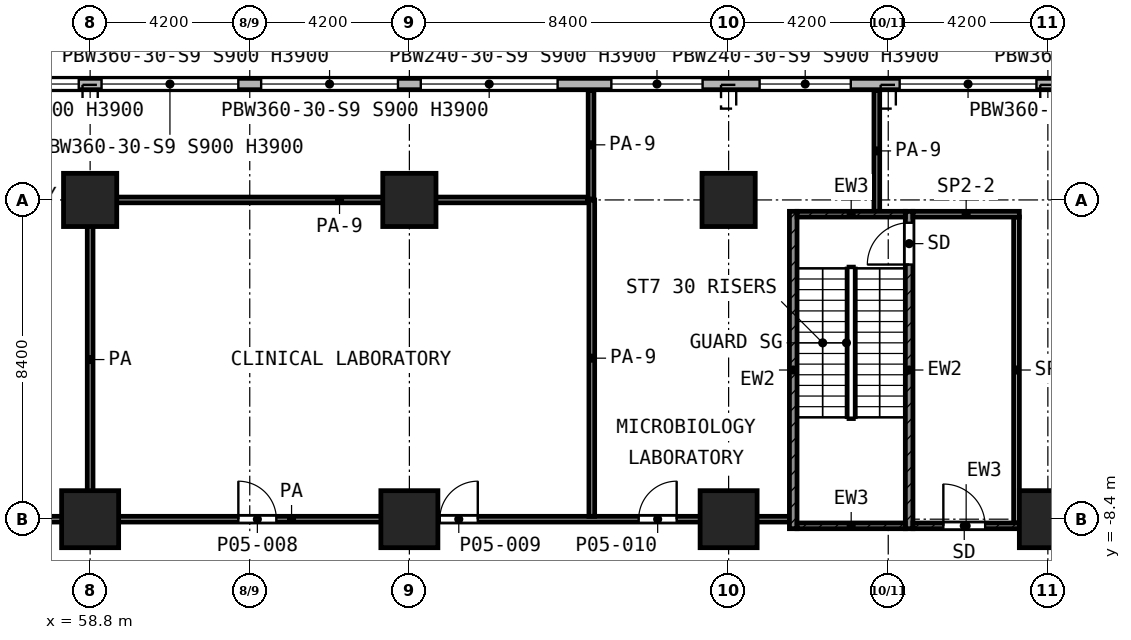
"""IFC4 building model, lengths in metres.
Left out: names, types, materials, properties, quantities, classifications, styles, units other than length and angle.
Written with IfcOpenShell. Run it as: python <this file> out.ifc"""

import sys

from ifc_helpers import new_model, si_unit, direction, frame, frame_2d, origin, origin_2d, place, context, subcontext, project, spatial, rectangle, extrude, element, fill, save


model = new_model("IFC4")
c1 = context("Model", 3, precision=1e-05, world=origin(), true_north=direction((0.0, 1.0)))
c2 = subcontext(c1, "Body", "Model", "MODEL_VIEW")
j1 = project(units=[si_unit("LENGTHUNIT", "METRE"), si_unit("PLANEANGLEUNIT", "RADIAN")], contexts=[c1])
p1 = place(None, origin())
s1 = spatial("IfcSite", under=j1, at=p1, CompositionType="ELEMENT")
p2 = place(p1, origin())
s2 = spatial("IfcBuilding", under=s1, at=p2, CompositionType="ELEMENT")
p3 = place(p2, frame((0.0, 0.0, 23.8)))
s3 = spatial("IfcBuildingStorey", under=s2, at=p3, CompositionType="ELEMENT", Elevation=23.8)
for number, where, z_axis, x_axis in (
    (1, (58.8, 0.0, 0.0), (0.0, 0.0, 1.0), (1.0, 0.0, 0.0)),
    (2, (67.2, 0.0, 0.0), (0.0, 0.0, 1.0), (1.0, 0.0, 0.0)),
    (3, (75.6, 0.0, 0.0), (0.0, 0.0, 1.0), (1.0, 0.0, 0.0)),
):
    element("IfcColumn", number, at=place(p3, frame(where, z_axis=z_axis, x_axis=x_axis)), inside=s3, PredefinedType="COLUMN", context=c2, shape_type="SweptSolid", body=[
        extrude(rectangle(XDim=1.4, YDim=1.4, at=origin_2d()), origin(), (0.0, 0.0, 1.0), 5.2),
    ])
for number, where, z_axis, x_axis in (
    (4, (58.8, -8.4, 0.0), (0.0, 0.0, 1.0), (1.0, 0.0, 0.0)),
    (5, (67.2, -8.4, 0.0), (0.0, 0.0, 1.0), (1.0, 0.0, 0.0)),
    (6, (75.6, -8.4, 0.0), (0.0, 0.0, 1.0), (1.0, 0.0, 0.0)),
    (7, (84.0, -8.4, 0.0), (0.0, 0.0, 1.0), (1.0, 0.0, 0.0)),
):
    element("IfcColumn", number, at=place(p3, frame(where, z_axis=z_axis, x_axis=x_axis)), inside=s3, PredefinedType="COLUMN", context=c2, shape_type="SweptSolid", body=[
        extrude(rectangle(XDim=1.5, YDim=1.5, at=origin_2d()), origin(), (0.0, 0.0, 1.0), 5.2),
    ])
p4 = place(p3, frame((89.538, 3.05, 0.0), z_axis=(0.0, 0.0, 1.0), x_axis=(-1.0, 0.0, 0.0)))
e8 = element("IfcWall", 8, at=p4, inside=s3, PredefinedType="SOLIDWALL", context=c2, shape_type="SweptSolid", body=[
    extrude(rectangle(XDim=86.676, YDim=0.3, at=frame_2d((43.338, 0.0))), origin(), (0.0, 0.0, 1.0), 4.85),
])
p5 = place(p4, frame((1.638, 0.0, 0.9)))
e9 = element("IfcOpeningElement", 9, at=p5, cuts=e8, PredefinedType="OPENING", context=c2, shape_type="SweptSolid", body=[
    extrude(rectangle(XDim=3.6, YDim=3.0, at=frame_2d((1.8, 1.5))), frame((0.0, 0.16, 0.0), z_axis=(0.0, -1.0, 0.0), x_axis=(1.0, 0.0, 0.0)), (0.0, 0.0, 1.0), 0.32),
])
p6 = place(p4, frame((5.838, 0.0, 0.9)))
e10 = element("IfcOpeningElement", 10, at=p6, cuts=e8, PredefinedType="OPENING", context=c2, shape_type="SweptSolid", body=[
    extrude(rectangle(XDim=3.6, YDim=3.0, at=frame_2d((1.8, 1.5))), frame((0.0, 0.16, 0.0), z_axis=(0.0, -1.0, 0.0), x_axis=(1.0, 0.0, 0.0)), (0.0, 0.0, 1.0), 0.32),
])
p7 = place(p4, frame((10.723, 0.0, 0.9)))
e11 = element("IfcOpeningElement", 11, at=p7, cuts=e8, PredefinedType="OPENING", context=c2, shape_type="SweptSolid", body=[
    extrude(rectangle(XDim=2.4, YDim=3.0, at=frame_2d((1.2, 1.5))), frame((0.0, 0.16, 0.0), z_axis=(0.0, -1.0, 0.0), x_axis=(1.0, 0.0, 0.0)), (0.0, 0.0, 1.0), 0.32),
])
p8 = place(p4, frame((14.623, 0.0, 0.9)))
e12 = element("IfcOpeningElement", 12, at=p8, cuts=e8, PredefinedType="OPENING", context=c2, shape_type="SweptSolid", body=[
    extrude(rectangle(XDim=2.4, YDim=3.0, at=frame_2d((1.2, 1.5))), frame((0.0, 0.16, 0.0), z_axis=(0.0, -1.0, 0.0), x_axis=(1.0, 0.0, 0.0)), (0.0, 0.0, 1.0), 0.32),
])
p9 = place(p4, frame((18.438, 0.0, 0.9)))
e13 = element("IfcOpeningElement", 13, at=p9, cuts=e8, PredefinedType="OPENING", context=c2, shape_type="SweptSolid", body=[
    extrude(rectangle(XDim=3.6, YDim=3.0, at=frame_2d((1.8, 1.5))), frame((0.0, 0.16, 0.0), z_axis=(0.0, -1.0, 0.0), x_axis=(1.0, 0.0, 0.0)), (0.0, 0.0, 1.0), 0.32),
])
p10 = place(p4, frame((22.638, 0.0, 0.9)))
e14 = element("IfcOpeningElement", 14, at=p10, cuts=e8, PredefinedType="OPENING", context=c2, shape_type="SweptSolid", body=[
    extrude(rectangle(XDim=3.6, YDim=3.0, at=frame_2d((1.8, 1.5))), frame((0.0, 0.16, 0.0), z_axis=(0.0, -1.0, 0.0), x_axis=(1.0, 0.0, 0.0)), (0.0, 0.0, 1.0), 0.32),
])
p11 = place(p4, frame((26.838, 0.0, 0.9)))
e15 = element("IfcOpeningElement", 15, at=p11, cuts=e8, PredefinedType="OPENING", context=c2, shape_type="SweptSolid", body=[
    extrude(rectangle(XDim=3.6, YDim=3.0, at=frame_2d((1.8, 1.5))), frame((0.0, 0.16, 0.0), z_axis=(0.0, -1.0, 0.0), x_axis=(1.0, 0.0, 0.0)), (0.0, 0.0, 1.0), 0.32),
])
p12 = place(p4, frame((31.038, 0.0, 0.9)))
e16 = element("IfcOpeningElement", 16, at=p12, cuts=e8, PredefinedType="OPENING", context=c2, shape_type="SweptSolid", body=[
    extrude(rectangle(XDim=3.6, YDim=3.0, at=frame_2d((1.8, 1.5))), frame((0.0, 0.16, 0.0), z_axis=(0.0, -1.0, 0.0), x_axis=(1.0, 0.0, 0.0)), (0.0, 0.0, 1.0), 0.32),
])
p13 = place(p4, frame((35.238, 0.0, 0.9)))
e17 = element("IfcOpeningElement", 17, at=p13, cuts=e8, PredefinedType="OPENING", context=c2, shape_type="SweptSolid", body=[
    extrude(rectangle(XDim=3.6, YDim=3.0, at=frame_2d((1.8, 1.5))), frame((0.0, 0.16, 0.0), z_axis=(0.0, -1.0, 0.0), x_axis=(1.0, 0.0, 0.0)), (0.0, 0.0, 1.0), 0.32),
])
p14 = place(p4, frame((39.438, 0.0, 0.9)))
e18 = element("IfcOpeningElement", 18, at=p14, cuts=e8, PredefinedType="OPENING", context=c2, shape_type="SweptSolid", body=[
    extrude(rectangle(XDim=3.6, YDim=3.0, at=frame_2d((1.8, 1.5))), frame((0.0, 0.16, 0.0), z_axis=(0.0, -1.0, 0.0), x_axis=(1.0, 0.0, 0.0)), (0.0, 0.0, 1.0), 0.32),
])
p15 = place(p4, frame((43.638, 0.0, 0.9)))
e19 = element("IfcOpeningElement", 19, at=p15, cuts=e8, PredefinedType="OPENING", context=c2, shape_type="SweptSolid", body=[
    extrude(rectangle(XDim=3.6, YDim=3.0, at=frame_2d((1.8, 1.5))), frame((0.0, 0.16, 0.0), z_axis=(0.0, -1.0, 0.0), x_axis=(1.0, 0.0, 0.0)), (0.0, 0.0, 1.0), 0.32),
])
p16 = place(p4, frame((49.673, 0.0, 0.9)))
e20 = element("IfcOpeningElement", 20, at=p16, cuts=e8, PredefinedType="OPENING", context=c2, shape_type="SweptSolid", body=[
    extrude(rectangle(XDim=1.2, YDim=3.0, at=frame_2d((0.6, 1.5))), frame((0.0, 0.16, 0.0), z_axis=(0.0, -1.0, 0.0), x_axis=(1.0, 0.0, 0.0)), (0.0, 0.0, 1.0), 0.32),
])
p17 = place(p4, frame((52.038, 0.0, 0.9)))
e21 = element("IfcOpeningElement", 21, at=p17, cuts=e8, PredefinedType="OPENING", context=c2, shape_type="SweptSolid", body=[
    extrude(rectangle(XDim=3.6, YDim=3.0, at=frame_2d((1.8, 1.5))), frame((0.0, 0.16, 0.0), z_axis=(0.0, -1.0, 0.0), x_axis=(1.0, 0.0, 0.0)), (0.0, 0.0, 1.0), 0.32),
])
p18 = place(p4, frame((56.623, 0.0, 0.9)))
e22 = element("IfcOpeningElement", 22, at=p18, cuts=e8, PredefinedType="OPENING", context=c2, shape_type="SweptSolid", body=[
    extrude(rectangle(XDim=2.4, YDim=3.0, at=frame_2d((1.2, 1.5))), frame((0.0, 0.16, 0.0), z_axis=(0.0, -1.0, 0.0), x_axis=(1.0, 0.0, 0.0)), (0.0, 0.0, 1.0), 0.32),
])
p19 = place(p4, frame((60.438, 0.0, 0.9)))
e23 = element("IfcOpeningElement", 23, at=p19, cuts=e8, PredefinedType="OPENING", context=c2, shape_type="SweptSolid", body=[
    extrude(rectangle(XDim=3.6, YDim=3.0, at=frame_2d((1.8, 1.5))), frame((0.0, 0.16, 0.0), z_axis=(0.0, -1.0, 0.0), x_axis=(1.0, 0.0, 0.0)), (0.0, 0.0, 1.0), 0.32),
])
p20 = place(p4, frame((64.638, 0.0, 0.9)))
e24 = element("IfcOpeningElement", 24, at=p20, cuts=e8, PredefinedType="OPENING", context=c2, shape_type="SweptSolid", body=[
    extrude(rectangle(XDim=3.6, YDim=3.0, at=frame_2d((1.8, 1.5))), frame((0.0, 0.16, 0.0), z_axis=(0.0, -1.0, 0.0), x_axis=(1.0, 0.0, 0.0)), (0.0, 0.0, 1.0), 0.32),
])
p21 = place(p4, frame((68.838, 0.0, 0.9)))
e25 = element("IfcOpeningElement", 25, at=p21, cuts=e8, PredefinedType="OPENING", context=c2, shape_type="SweptSolid", body=[
    extrude(rectangle(XDim=3.6, YDim=3.0, at=frame_2d((1.8, 1.5))), frame((0.0, 0.16, 0.0), z_axis=(0.0, -1.0, 0.0), x_axis=(1.0, 0.0, 0.0)), (0.0, 0.0, 1.0), 0.32),
])
p22 = place(p4, frame((73.038, 0.0, 0.9)))
e26 = element("IfcOpeningElement", 26, at=p22, cuts=e8, PredefinedType="OPENING", context=c2, shape_type="SweptSolid", body=[
    extrude(rectangle(XDim=3.6, YDim=3.0, at=frame_2d((1.8, 1.5))), frame((0.0, 0.16, 0.0), z_axis=(0.0, -1.0, 0.0), x_axis=(1.0, 0.0, 0.0)), (0.0, 0.0, 1.0), 0.32),
])
p23 = place(p4, frame((77.238, 0.0, 0.9)))
e27 = element("IfcOpeningElement", 27, at=p23, cuts=e8, PredefinedType="OPENING", context=c2, shape_type="SweptSolid", body=[
    extrude(rectangle(XDim=3.6, YDim=3.0, at=frame_2d((1.8, 1.5))), frame((0.0, 0.16, 0.0), z_axis=(0.0, -1.0, 0.0), x_axis=(1.0, 0.0, 0.0)), (0.0, 0.0, 1.0), 0.32),
])
p24 = place(p4, frame((81.438, 0.0, 0.9)))
e28 = element("IfcOpeningElement", 28, at=p24, cuts=e8, PredefinedType="OPENING", context=c2, shape_type="SweptSolid", body=[
    extrude(rectangle(XDim=3.6, YDim=3.0, at=frame_2d((1.8, 1.5))), frame((0.0, 0.16, 0.0), z_axis=(0.0, -1.0, 0.0), x_axis=(1.0, 0.0, 0.0)), (0.0, 0.0, 1.0), 0.32),
])
p25 = place(p3, frame((77.3, -8.65, 0.0), z_axis=(0.0, 0.0, 1.0), x_axis=(0.0, 1.0, 0.0)))
e29 = element("IfcWall", 29, at=p25, inside=s3, PredefinedType="SHEAR", context=c2, shape_type="SweptSolid", body=[
    extrude(rectangle(XDim=8.35, YDim=0.2, at=frame_2d((4.175, 0.0))), origin(), (0.0, 0.0, 1.0), 4.85),
])
p26 = place(p3, frame((80.35, -8.65, 0.0), z_axis=(0.0, 0.0, 1.0), x_axis=(0.0, 1.0, 0.0)))
e30 = element("IfcWall", 30, at=p26, inside=s3, PredefinedType="SHEAR", context=c2, shape_type="SweptSolid", body=[
    extrude(rectangle(XDim=8.35, YDim=0.2, at=frame_2d((4.175, 0.0))), origin(), (0.0, 0.0, 1.0), 4.85),
])
p27 = place(p26, frame((6.95, 0.0, 0.0)))
e31 = element("IfcOpeningElement", 31, at=p27, cuts=e30, PredefinedType="OPENING", context=c2, shape_type="SweptSolid", body=[
    extrude(rectangle(XDim=1.1, YDim=2.1, at=frame_2d((0.55, 1.05))), frame((0.0, 0.11, 0.0), z_axis=(0.0, -1.0, 0.0), x_axis=(1.0, 0.0, 0.0)), (0.0, 0.0, 1.0), 0.22),
])
p28 = place(p3, frame((77.4, -0.375, 0.0), z_axis=(0.0, 0.0, 1.0), x_axis=(1.0, 0.0, 0.0)))
e32 = element("IfcWall", 32, at=p28, inside=s3, PredefinedType="SHEAR", context=c2, shape_type="SweptSolid", body=[
    extrude(rectangle(XDim=2.85, YDim=0.15, at=frame_2d((1.425, 0.0))), origin(), (0.0, 0.0, 1.0), 4.85),
])
p29 = place(p3, frame((80.45, -0.375, 0.0), z_axis=(0.0, 0.0, 1.0), x_axis=(1.0, 0.0, 0.0)))
e33 = element("IfcWall", 33, at=p29, inside=s3, PredefinedType="PARTITIONING", context=c2, shape_type="SweptSolid", body=[
    extrude(rectangle(XDim=2.8, YDim=0.15, at=frame_2d((1.4, 0.0))), origin(), (0.0, 0.0, 1.0), 3.45),
])
p30 = place(p3, frame((77.4, -8.575, 0.0), z_axis=(0.0, 0.0, 1.0), x_axis=(1.0, 0.0, 0.0)))
e34 = element("IfcWall", 34, at=p30, inside=s3, PredefinedType="SHEAR", context=c2, shape_type="SweptSolid", body=[
    extrude(rectangle(XDim=2.85, YDim=0.15, at=frame_2d((1.425, 0.0))), origin(), (0.0, 0.0, 1.0), 4.85),
])
p31 = place(p3, frame((80.45, -8.575, 0.0), z_axis=(0.0, 0.0, 1.0), x_axis=(1.0, 0.0, 0.0)))
e35 = element("IfcWall", 35, at=p31, inside=s3, PredefinedType="SHEAR", context=c2, shape_type="SweptSolid", body=[
    extrude(rectangle(XDim=2.8, YDim=0.15, at=frame_2d((1.4, 0.0))), origin(), (0.0, 0.0, 1.0), 4.85),
])
p32 = place(p31, frame((0.8, 0.0, 0.0)))
e36 = element("IfcOpeningElement", 36, at=p32, cuts=e35, PredefinedType="OPENING", context=c2, shape_type="SweptSolid", body=[
    extrude(rectangle(XDim=1.1, YDim=2.1, at=frame_2d((0.55, 1.05))), frame((0.0, 0.085, 0.0), z_axis=(0.0, -1.0, 0.0), x_axis=(1.0, 0.0, 0.0)), (0.0, 0.0, 1.0), 0.17),
])
p33 = place(p3, frame((83.175, -8.5, 0.0), z_axis=(0.0, 0.0, 1.0), x_axis=(0.0, 1.0, 0.0)))
e37 = element("IfcWall", 37, at=p33, inside=s3, PredefinedType="PARTITIONING", context=c2, shape_type="SweptSolid", body=[
    extrude(rectangle(XDim=8.05, YDim=0.15, at=frame_2d((4.025, 0.0))), origin(), (0.0, 0.0, 1.0), 4.85),
])
p34 = place(p3, frame((51.0, -8.4, 0.0), z_axis=(0.0, 0.0, 1.0), x_axis=(1.0, 0.0, 0.0)))
e38 = element("IfcWall", 38, at=p34, inside=s3, PredefinedType="PARTITIONING", context=c2, shape_type="SweptSolid", body=[
    extrude(rectangle(XDim=26.2, YDim=0.15, at=frame_2d((13.1, 0.0))), origin(), (0.0, 0.0, 1.0), 4.85),
])
p35 = place(p34, frame((2.05, 0.0, 0.0)))
e39 = element("IfcOpeningElement", 39, at=p35, cuts=e38, PredefinedType="OPENING", context=c2, shape_type="SweptSolid", body=[
    extrude(rectangle(XDim=1.0, YDim=2.1, at=frame_2d((0.5, 1.05))), frame((0.0, 0.085, 0.0), z_axis=(0.0, -1.0, 0.0), x_axis=(1.0, 0.0, 0.0)), (0.0, 0.0, 1.0), 0.17),
])
p36 = place(p34, frame((4.675, 0.0, 0.0)))
e40 = element("IfcOpeningElement", 40, at=p36, cuts=e38, PredefinedType="OPENING", context=c2, shape_type="SweptSolid", body=[
    extrude(rectangle(XDim=1.0, YDim=2.1, at=frame_2d((0.5, 1.05))), frame((0.0, 0.085, 0.0), z_axis=(0.0, -1.0, 0.0), x_axis=(1.0, 0.0, 0.0)), (0.0, 0.0, 1.0), 0.17),
])
p37 = place(p34, frame((11.7, 0.0, 0.0)))
e41 = element("IfcOpeningElement", 41, at=p37, cuts=e38, PredefinedType="OPENING", context=c2, shape_type="SweptSolid", body=[
    extrude(rectangle(XDim=1.0, YDim=2.1, at=frame_2d((0.5, 1.05))), frame((0.0, 0.085, 0.0), z_axis=(0.0, -1.0, 0.0), x_axis=(1.0, 0.0, 0.0)), (0.0, 0.0, 1.0), 0.17),
])
p38 = place(p34, frame((17.0, 0.0, 0.0)))
e42 = element("IfcOpeningElement", 42, at=p38, cuts=e38, PredefinedType="OPENING", context=c2, shape_type="SweptSolid", body=[
    extrude(rectangle(XDim=1.0, YDim=2.1, at=frame_2d((0.5, 1.05))), frame((0.0, 0.085, 0.0), z_axis=(0.0, -1.0, 0.0), x_axis=(1.0, 0.0, 0.0)), (0.0, 0.0, 1.0), 0.17),
])
p39 = place(p34, frame((22.233, 0.0, 0.0)))
e43 = element("IfcOpeningElement", 43, at=p39, cuts=e38, PredefinedType="OPENING", context=c2, shape_type="SweptSolid", body=[
    extrude(rectangle(XDim=1.0, YDim=2.1, at=frame_2d((0.5, 1.05))), frame((0.0, 0.085, 0.0), z_axis=(0.0, -1.0, 0.0), x_axis=(1.0, 0.0, 0.0)), (0.0, 0.0, 1.0), 0.17),
])
p40 = place(p3, frame((83.33, -8.4, 0.0), z_axis=(0.0, 0.0, 1.0), x_axis=(1.0, 0.0, 0.0)))
e44 = element("IfcWall", 44, at=p40, inside=s3, PredefinedType="PARTITIONING", context=c2, shape_type="SweptSolid", body=[
    extrude(rectangle(XDim=11.95, YDim=0.15, at=frame_2d((5.975, 0.0))), origin(), (0.0, 0.0, 1.0), 3.45),
])
p41 = place(p40, frame((3.59, 0.0, 0.0)))
e45 = element("IfcOpeningElement", 45, at=p41, cuts=e44, PredefinedType="OPENING", context=c2, shape_type="SweptSolid", body=[
    extrude(rectangle(XDim=1.0, YDim=2.1, at=frame_2d((0.5, 1.05))), frame((0.0, 0.085, 0.0), z_axis=(0.0, -1.0, 0.0), x_axis=(1.0, 0.0, 0.0)), (0.0, 0.0, 1.0), 0.17),
])
p42 = place(p40, frame((7.68, 0.0, 0.0)))
e46 = element("IfcOpeningElement", 46, at=p42, cuts=e44, PredefinedType="OPENING", context=c2, shape_type="SweptSolid", body=[
    extrude(rectangle(XDim=1.0, YDim=2.1, at=frame_2d((0.5, 1.05))), frame((0.0, 0.085, 0.0), z_axis=(0.0, -1.0, 0.0), x_axis=(1.0, 0.0, 0.0)), (0.0, 0.0, 1.0), 0.17),
])
p43 = place(p3, frame((58.84, 0.0, 0.0), z_axis=(0.0, 0.0, 1.0), x_axis=(1.0, 0.0, 0.0)))
e47 = element("IfcWall", 47, at=p43, inside=s3, PredefinedType="PARTITIONING", context=c2, shape_type="SweptSolid", body=[
    extrude(rectangle(XDim=13.045, YDim=0.15, at=frame_2d((6.522, 0.0))), origin(), (0.0, 0.0, 1.0), 3.45),
])
p44 = place(p3, frame((58.8, -8.325, 0.0), z_axis=(0.0, 0.0, 1.0), x_axis=(0.0, 1.0, 0.0)))
e48 = element("IfcWall", 48, at=p44, inside=s3, PredefinedType="PARTITIONING", context=c2, shape_type="SweptSolid", body=[
    extrude(rectangle(XDim=8.25, YDim=0.15, at=frame_2d((4.125, 0.0))), origin(), (0.0, 0.0, 1.0), 4.85),
])
p45 = place(p3, frame((71.98, 0.02, 0.0), z_axis=(0.0, 0.0, 1.0), x_axis=(0.0, 1.0, 0.0)))
e49 = element("IfcWall", 49, at=p45, inside=s3, PredefinedType="PARTITIONING", context=c2, shape_type="SweptSolid", body=[
    extrude(rectangle(XDim=2.86, YDim=0.15, at=frame_2d((1.43, 0.0))), origin(), (0.0, 0.0, 1.0), 3.45),
])
p46 = place(p3, frame((72.0, -8.325, 0.0), z_axis=(0.0, 0.0, 1.0), x_axis=(0.0, 1.0, 0.0)))
e50 = element("IfcWall", 50, at=p46, inside=s3, PredefinedType="PARTITIONING", context=c2, shape_type="SweptSolid", body=[
    extrude(rectangle(XDim=8.323, YDim=0.15, at=frame_2d((4.162, 0.0))), origin(), (0.0, 0.0, 1.0), 3.45),
])
p47 = place(p3, frame((79.5, -0.3, 0.0), z_axis=(0.0, 0.0, 1.0), x_axis=(0.0, 1.0, 0.0)))
e51 = element("IfcWall", 51, at=p47, inside=s3, PredefinedType="PARTITIONING", context=c2, shape_type="SweptSolid", body=[
    extrude(rectangle(XDim=3.18, YDim=0.15, at=frame_2d((1.59, 0.0))), origin(), (0.0, 0.0, 1.0), 3.45),
])
p48 = place(p6, origin())
e52 = element("IfcWindow", 52, at=p48, inside=s3, PartitioningType="SINGLE_PANEL", PredefinedType="WINDOW", context=c2, shape_type="SweptSolid", body=[
    extrude(rectangle(XDim=3.6, YDim=3.0, at=frame_2d((1.8, 1.5))), frame((0.0, 0.03, 0.0), z_axis=(0.0, -1.0, 0.0), x_axis=(1.0, 0.0, 0.0)), (0.0, 0.0, 1.0), 0.06),
])
fill(e10, e52)
p49 = place(p7, origin())
e53 = element("IfcWindow", 53, at=p49, inside=s3, PartitioningType="SINGLE_PANEL", PredefinedType="WINDOW", context=c2, shape_type="SweptSolid", body=[
    extrude(rectangle(XDim=2.4, YDim=3.0, at=frame_2d((1.2, 1.5))), frame((0.0, 0.03, 0.0), z_axis=(0.0, -1.0, 0.0), x_axis=(1.0, 0.0, 0.0)), (0.0, 0.0, 1.0), 0.06),
])
fill(e11, e53)
p50 = place(p8, origin())
e54 = element("IfcWindow", 54, at=p50, inside=s3, PartitioningType="SINGLE_PANEL", PredefinedType="WINDOW", context=c2, shape_type="SweptSolid", body=[
    extrude(rectangle(XDim=2.4, YDim=3.0, at=frame_2d((1.2, 1.5))), frame((0.0, 0.03, 0.0), z_axis=(0.0, -1.0, 0.0), x_axis=(1.0, 0.0, 0.0)), (0.0, 0.0, 1.0), 0.06),
])
fill(e12, e54)
p51 = place(p9, origin())
e55 = element("IfcWindow", 55, at=p51, inside=s3, PartitioningType="SINGLE_PANEL", PredefinedType="WINDOW", context=c2, shape_type="SweptSolid", body=[
    extrude(rectangle(XDim=3.6, YDim=3.0, at=frame_2d((1.8, 1.5))), frame((0.0, 0.03, 0.0), z_axis=(0.0, -1.0, 0.0), x_axis=(1.0, 0.0, 0.0)), (0.0, 0.0, 1.0), 0.06),
])
fill(e13, e55)
p52 = place(p10, origin())
e56 = element("IfcWindow", 56, at=p52, inside=s3, PartitioningType="SINGLE_PANEL", PredefinedType="WINDOW", context=c2, shape_type="SweptSolid", body=[
    extrude(rectangle(XDim=3.6, YDim=3.0, at=frame_2d((1.8, 1.5))), frame((0.0, 0.03, 0.0), z_axis=(0.0, -1.0, 0.0), x_axis=(1.0, 0.0, 0.0)), (0.0, 0.0, 1.0), 0.06),
])
fill(e14, e56)
p53 = place(p11, origin())
e57 = element("IfcWindow", 57, at=p53, inside=s3, PartitioningType="SINGLE_PANEL", PredefinedType="WINDOW", context=c2, shape_type="SweptSolid", body=[
    extrude(rectangle(XDim=3.6, YDim=3.0, at=frame_2d((1.8, 1.5))), frame((0.0, 0.03, 0.0), z_axis=(0.0, -1.0, 0.0), x_axis=(1.0, 0.0, 0.0)), (0.0, 0.0, 1.0), 0.06),
])
fill(e15, e57)
p54 = place(p12, origin())
e58 = element("IfcWindow", 58, at=p54, inside=s3, PartitioningType="SINGLE_PANEL", PredefinedType="WINDOW", context=c2, shape_type="SweptSolid", body=[
    extrude(rectangle(XDim=3.6, YDim=3.0, at=frame_2d((1.8, 1.5))), frame((0.0, 0.03, 0.0), z_axis=(0.0, -1.0, 0.0), x_axis=(1.0, 0.0, 0.0)), (0.0, 0.0, 1.0), 0.06),
])
fill(e16, e58)
p55 = place(p27, origin())
e59 = element("IfcDoor", 59, at=p55, inside=s3, OperationType="SINGLE_SWING_LEFT", PredefinedType="DOOR", context=c2, shape_type="SweptSolid", body=[
    extrude(rectangle(XDim=1.1, YDim=2.1, at=frame_2d((0.55, 1.05))), frame((0.0, 0.025, 0.0), z_axis=(0.0, -1.0, 0.0), x_axis=(1.0, 0.0, 0.0)), (0.0, 0.0, 1.0), 0.05),
])
fill(e31, e59)
p56 = place(p32, origin())
e60 = element("IfcDoor", 60, at=p56, inside=s3, OperationType="SINGLE_SWING_LEFT", PredefinedType="DOOR", context=c2, shape_type="SweptSolid", body=[
    extrude(rectangle(XDim=1.1, YDim=2.1, at=frame_2d((0.55, 1.05))), frame((0.0, 0.025, 0.0), z_axis=(0.0, -1.0, 0.0), x_axis=(1.0, 0.0, 0.0)), (0.0, 0.0, 1.0), 0.05),
])
fill(e36, e60)
p57 = place(p37, origin())
e61 = element("IfcDoor", 61, at=p57, inside=s3, OperationType="SINGLE_SWING_LEFT", PredefinedType="DOOR", context=c2, shape_type="SweptSolid", body=[
    extrude(rectangle(XDim=1.0, YDim=2.1, at=frame_2d((0.5, 1.05))), frame((0.0, 0.025, 0.0), z_axis=(0.0, -1.0, 0.0), x_axis=(1.0, 0.0, 0.0)), (0.0, 0.0, 1.0), 0.05),
])
fill(e41, e61)
p58 = place(p38, origin())
e62 = element("IfcDoor", 62, at=p58, inside=s3, OperationType="SINGLE_SWING_RIGHT", PredefinedType="DOOR", context=c2, shape_type="SweptSolid", body=[
    extrude(rectangle(XDim=1.0, YDim=2.1, at=frame_2d((0.5, 1.05))), frame((0.0, 0.025, 0.0), z_axis=(0.0, -1.0, 0.0), x_axis=(1.0, 0.0, 0.0)), (0.0, 0.0, 1.0), 0.05),
])
fill(e42, e62)
p59 = place(p39, origin())
e63 = element("IfcDoor", 63, at=p59, inside=s3, OperationType="SINGLE_SWING_RIGHT", PredefinedType="DOOR", context=c2, shape_type="SweptSolid", body=[
    extrude(rectangle(XDim=1.0, YDim=2.1, at=frame_2d((0.5, 1.05))), frame((0.0, 0.025, 0.0), z_axis=(0.0, -1.0, 0.0), x_axis=(1.0, 0.0, 0.0)), (0.0, 0.0, 1.0), 0.05),
])
fill(e43, e63)
save(model, sys.argv[1])
